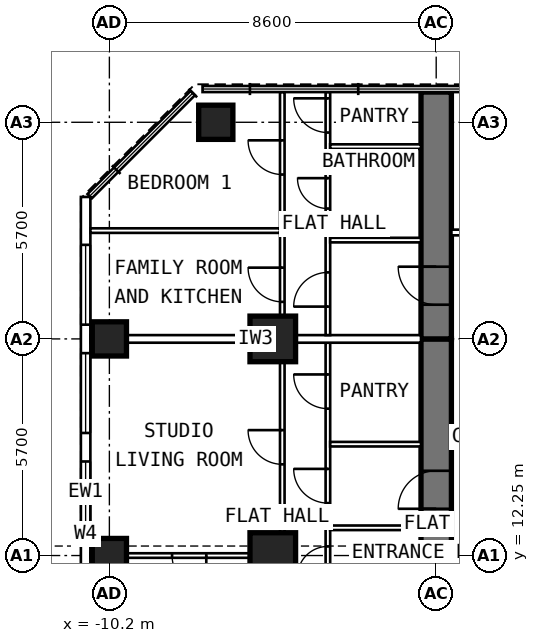
"""IFC4 building model, lengths in metres.
Left out: names, types, materials, properties, quantities, classifications, styles, units other than length and angle.
Written with IfcOpenShell. Run it as: python <this file> out.ifc"""

import sys

from ifc_helpers import new_model, si_unit, direction, frame, frame_2d, origin, origin_2d, place, context, subcontext, project, spatial, rectangle, extrude, element, fill, save


model = new_model("IFC4")
c1 = context("Model", 3, precision=1e-05, world=origin(), true_north=direction((0.0, 1.0)))
c2 = subcontext(c1, "Body", "Model", "MODEL_VIEW")
j1 = project(units=[si_unit("LENGTHUNIT", "METRE"), si_unit("PLANEANGLEUNIT", "RADIAN")], contexts=[c1])
p1 = place(None, origin())
s1 = spatial("IfcSite", under=j1, at=p1, CompositionType="ELEMENT")
p2 = place(p1, origin())
s2 = spatial("IfcBuilding", under=s1, at=p2, CompositionType="ELEMENT")
p3 = place(p2, frame((0.0, 0.0, 183.2)))
s3 = spatial("IfcBuildingStorey", under=s2, at=p3, CompositionType="ELEMENT", Elevation=183.2)
for number, where, z_axis, x_axis in (
    (1, (-10.2, 12.25, 0.0), (0.0, 0.0, 1.0), (0.0, 1.0, 0.0)),
    (2, (-10.2, 17.95, 0.0), (0.0, 0.0, 1.0), (0.0, 1.0, 0.0)),
    (3, (-7.4, 23.65, 0.0), (0.0, 0.0, 1.0), (0.0, 1.0, 0.0)),
):
    element("IfcColumn", number, at=place(p3, frame(where, z_axis=z_axis, x_axis=x_axis)), inside=s3, PredefinedType="COLUMN", context=c2, shape_type="SweptSolid", body=[
        extrude(rectangle(XDim=0.9, YDim=0.9, at=origin_2d()), origin(), (0.0, 0.0, 1.0), 3.6),
    ])
for number, where, z_axis, x_axis in (
    (4, (-5.9, 12.25, 0.0), (0.0, 0.0, 1.0), (0.0, 1.0, 0.0)),
    (5, (-5.9, 17.95, 0.0), (0.0, 0.0, 1.0), (0.0, 1.0, 0.0)),
):
    element("IfcColumn", number, at=place(p3, frame(where, z_axis=z_axis, x_axis=x_axis)), inside=s3, PredefinedType="COLUMN", context=c2, shape_type="SweptSolid", body=[
        extrude(rectangle(XDim=1.2, YDim=1.2, at=origin_2d()), origin(), (0.0, 0.0, 1.0), 3.6),
    ])
p4 = place(p3, frame((-1.6, 9.6, 0.0), z_axis=(0.0, 0.0, 1.0), x_axis=(0.0, 1.0, 0.0)))
e6 = element("IfcWall", 6, at=p4, inside=s3, PredefinedType="SHEAR", context=c2, shape_type="SweptSolid", body=[
    extrude(rectangle(XDim=8.35, YDim=0.8, at=frame_2d((4.175, 0.0))), origin(), (0.0, 0.0, 1.0), 3.6),
])
p5 = place(p4, frame((3.88, 0.0, 0.0)))
e7 = element("IfcOpeningElement", 7, at=p5, cuts=e6, PredefinedType="OPENING", context=c2, shape_type="SweptSolid", body=[
    extrude(rectangle(XDim=1.0, YDim=2.1, at=frame_2d((0.5, 1.05))), frame((0.0, 0.412, 0.0), z_axis=(0.0, -1.0, 0.0), x_axis=(1.0, 0.0, 0.0)), (0.0, 0.0, 1.0), 0.824),
])
p6 = place(p3, frame((-1.6, 17.95, 0.0), z_axis=(0.0, 0.0, 1.0), x_axis=(0.0, 1.0, 0.0)))
e8 = element("IfcWall", 8, at=p6, inside=s3, PredefinedType="SHEAR", context=c2, shape_type="SweptSolid", body=[
    extrude(rectangle(XDim=6.495, YDim=0.8, at=frame_2d((3.248, 0.0))), origin(), (0.0, 0.0, 1.0), 3.6),
])
p7 = place(p6, frame((0.9, 0.0, 0.0)))
e9 = element("IfcOpeningElement", 9, at=p7, cuts=e8, PredefinedType="OPENING", context=c2, shape_type="SweptSolid", body=[
    extrude(rectangle(XDim=1.0, YDim=2.1, at=frame_2d((0.5, 1.05))), frame((0.0, 0.412, 0.0), z_axis=(0.0, -1.0, 0.0), x_axis=(1.0, 0.0, 0.0)), (0.0, 0.0, 1.0), 0.824),
])
p8 = place(p3, frame((-10.825, 6.148, 0.0), z_axis=(0.0, 0.0, 1.0), x_axis=(0.0, 1.0, 0.0)))
e10 = element("IfcWall", 10, at=p8, inside=s3, PredefinedType="SOLIDWALL", context=c2, shape_type="SweptSolid", body=[
    extrude(rectangle(XDim=15.537, YDim=0.25, at=frame_2d((7.769, 0.0))), origin(), (0.0, 0.0, 1.0), 3.3),
])
p9 = place(p8, frame((0.777, 0.0, 0.8)))
e11 = element("IfcOpeningElement", 11, at=p9, cuts=e10, PredefinedType="OPENING", context=c2, shape_type="SweptSolid", body=[
    extrude(rectangle(XDim=2.1, YDim=1.8, at=frame_2d((1.05, 0.9))), frame((0.0, 0.137, 0.0), z_axis=(0.0, -1.0, 0.0), x_axis=(1.0, 0.0, 0.0)), (0.0, 0.0, 1.0), 0.274),
])
p10 = place(p8, frame((3.627, 0.0, 0.8)))
e12 = element("IfcOpeningElement", 12, at=p10, cuts=e10, PredefinedType="OPENING", context=c2, shape_type="SweptSolid", body=[
    extrude(rectangle(XDim=2.1, YDim=1.8, at=frame_2d((1.05, 0.9))), frame((0.0, 0.137, 0.0), z_axis=(0.0, -1.0, 0.0), x_axis=(1.0, 0.0, 0.0)), (0.0, 0.0, 1.0), 0.274),
])
p11 = place(p8, frame((6.477, 0.0, 0.8)))
e13 = element("IfcOpeningElement", 13, at=p11, cuts=e10, PredefinedType="OPENING", context=c2, shape_type="SweptSolid", body=[
    extrude(rectangle(XDim=2.1, YDim=1.8, at=frame_2d((1.05, 0.9))), frame((0.0, 0.137, 0.0), z_axis=(0.0, -1.0, 0.0), x_axis=(1.0, 0.0, 0.0)), (0.0, 0.0, 1.0), 0.274),
])
p12 = place(p8, frame((9.327, 0.0, 0.8)))
e14 = element("IfcOpeningElement", 14, at=p12, cuts=e10, PredefinedType="OPENING", context=c2, shape_type="SweptSolid", body=[
    extrude(rectangle(XDim=2.1, YDim=1.8, at=frame_2d((1.05, 0.9))), frame((0.0, 0.137, 0.0), z_axis=(0.0, -1.0, 0.0), x_axis=(1.0, 0.0, 0.0)), (0.0, 0.0, 1.0), 0.274),
])
p13 = place(p8, frame((12.177, 0.0, 0.8)))
e15 = element("IfcOpeningElement", 15, at=p13, cuts=e10, PredefinedType="OPENING", context=c2, shape_type="SweptSolid", body=[
    extrude(rectangle(XDim=2.1, YDim=1.8, at=frame_2d((1.05, 0.9))), frame((0.0, 0.137, 0.0), z_axis=(0.0, -1.0, 0.0), x_axis=(1.0, 0.0, 0.0)), (0.0, 0.0, 1.0), 0.274),
])
p14 = place(p3, frame((-4.45, 10.05, 0.0), z_axis=(0.0, 0.0, 1.0), x_axis=(0.0, 1.0, 0.0)))
e16 = element("IfcWall", 16, at=p14, inside=s3, PredefinedType="PARTITIONING", context=c2, shape_type="SweptSolid", body=[
    extrude(rectangle(XDim=7.8, YDim=0.12, at=frame_2d((3.9, 0.0))), origin(), (0.0, 0.0, 1.0), 3.3),
])
p15 = place(p14, frame((1.64, 0.0, 0.0)))
e17 = element("IfcOpeningElement", 17, at=p15, cuts=e16, PredefinedType="OPENING", context=c2, shape_type="SweptSolid", body=[
    extrude(rectangle(XDim=0.8, YDim=2.1, at=frame_2d((0.4, 1.05))), frame((0.0, 0.072, 0.0), z_axis=(0.0, -1.0, 0.0), x_axis=(1.0, 0.0, 0.0)), (0.0, 0.0, 1.0), 0.144),
])
p16 = place(p14, frame((3.58, 0.0, 0.0)))
e18 = element("IfcOpeningElement", 18, at=p16, cuts=e16, PredefinedType="OPENING", context=c2, shape_type="SweptSolid", body=[
    extrude(rectangle(XDim=0.9, YDim=2.1, at=frame_2d((0.45, 1.05))), frame((0.0, 0.072, 0.0), z_axis=(0.0, -1.0, 0.0), x_axis=(1.0, 0.0, 0.0)), (0.0, 0.0, 1.0), 0.144),
])
p17 = place(p14, frame((6.065, 0.0, 0.0)))
e19 = element("IfcOpeningElement", 19, at=p17, cuts=e16, PredefinedType="OPENING", context=c2, shape_type="SweptSolid", body=[
    extrude(rectangle(XDim=0.9, YDim=2.1, at=frame_2d((0.45, 1.05))), frame((0.0, 0.072, 0.0), z_axis=(0.0, -1.0, 0.0), x_axis=(1.0, 0.0, 0.0)), (0.0, 0.0, 1.0), 0.144),
])
p18 = place(p3, frame((-5.65, 9.6, 0.0), z_axis=(0.0, 0.0, 1.0), x_axis=(0.0, 1.0, 0.0)))
e20 = element("IfcWall", 20, at=p18, inside=s3, PredefinedType="PARTITIONING", context=c2, shape_type="SweptSolid", body=[
    extrude(rectangle(XDim=8.1, YDim=0.12, at=frame_2d((4.05, 0.0))), origin(), (0.0, 0.0, 1.0), 3.3),
])
p19 = place(p18, frame((5.05, 0.0, 0.0)))
e21 = element("IfcOpeningElement", 21, at=p19, cuts=e20, PredefinedType="OPENING", context=c2, shape_type="SweptSolid", body=[
    extrude(rectangle(XDim=0.9, YDim=2.1, at=frame_2d((0.45, 1.05))), frame((0.0, 0.072, 0.0), z_axis=(0.0, -1.0, 0.0), x_axis=(1.0, 0.0, 0.0)), (0.0, 0.0, 1.0), 0.144),
])
p20 = place(p3, frame((-5.71, 12.25, 0.0), z_axis=(0.0, 0.0, 1.0), x_axis=(-1.0, 0.0, 0.0)))
e22 = element("IfcWall", 22, at=p20, inside=s3, PredefinedType="PARTITIONING", context=c2, shape_type="SweptSolid", body=[
    extrude(rectangle(XDim=4.99, YDim=0.12, at=frame_2d((2.495, 0.0))), origin(), (0.0, 0.0, 1.0), 2.3),
])
p21 = place(p20, frame((1.94, 0.0, 0.0)))
e23 = element("IfcOpeningElement", 23, at=p21, cuts=e22, PredefinedType="OPENING", context=c2, shape_type="SweptSolid", body=[
    extrude(rectangle(XDim=0.9, YDim=2.1, at=frame_2d((0.45, 1.05))), frame((0.0, 0.072, 0.0), z_axis=(0.0, -1.0, 0.0), x_axis=(1.0, 0.0, 0.0)), (0.0, 0.0, 1.0), 0.144),
])
for number, where, z_axis, x_axis in (
    (24, (-2.0, 12.98, 0.0), (0.0, 0.0, 1.0), (-1.0, 0.0, 0.0)),
    (25, (-2.0, 15.18, 0.0), (0.0, 0.0, 1.0), (-1.0, 0.0, 0.0)),
):
    element("IfcWall", number, at=place(p3, frame(where, z_axis=z_axis, x_axis=x_axis)), inside=s3, PredefinedType="PARTITIONING", context=c2, shape_type="SweptSolid", body=[
        extrude(rectangle(XDim=2.39, YDim=0.12, at=frame_2d((1.195, 0.0))), origin(), (0.0, 0.0, 1.0), 3.3),
    ])
p22 = place(p3, frame((-4.45, 18.05, 0.0), z_axis=(0.0, 0.0, 1.0), x_axis=(0.0, 1.0, 0.0)))
e26 = element("IfcWall", 26, at=p22, inside=s3, PredefinedType="PARTITIONING", context=c2, shape_type="SweptSolid", body=[
    extrude(rectangle(XDim=6.395, YDim=0.12, at=frame_2d((3.198, 0.0))), origin(), (0.0, 0.0, 1.0), 3.3),
])
p23 = place(p22, frame((0.75, 0.0, 0.0)))
e27 = element("IfcOpeningElement", 27, at=p23, cuts=e26, PredefinedType="OPENING", context=c2, shape_type="SweptSolid", body=[
    extrude(rectangle(XDim=0.9, YDim=2.1, at=frame_2d((0.45, 1.05))), frame((0.0, 0.072, 0.0), z_axis=(0.0, -1.0, 0.0), x_axis=(1.0, 0.0, 0.0)), (0.0, 0.0, 1.0), 0.144),
])
p24 = place(p22, frame((3.33, 0.0, 0.0)))
e28 = element("IfcOpeningElement", 28, at=p24, cuts=e26, PredefinedType="OPENING", context=c2, shape_type="SweptSolid", body=[
    extrude(rectangle(XDim=0.8, YDim=2.1, at=frame_2d((0.4, 1.05))), frame((0.0, 0.072, 0.0), z_axis=(0.0, -1.0, 0.0), x_axis=(1.0, 0.0, 0.0)), (0.0, 0.0, 1.0), 0.144),
])
p25 = place(p22, frame((5.33, 0.0, 0.0)))
e29 = element("IfcOpeningElement", 29, at=p25, cuts=e26, PredefinedType="OPENING", context=c2, shape_type="SweptSolid", body=[
    extrude(rectangle(XDim=0.9, YDim=2.1, at=frame_2d((0.45, 1.05))), frame((0.0, 0.072, 0.0), z_axis=(0.0, -1.0, 0.0), x_axis=(1.0, 0.0, 0.0)), (0.0, 0.0, 1.0), 0.144),
])
p26 = place(p3, frame((-5.65, 18.05, 0.0), z_axis=(0.0, 0.0, 1.0), x_axis=(0.0, 1.0, 0.0)))
e30 = element("IfcWall", 30, at=p26, inside=s3, PredefinedType="PARTITIONING", context=c2, shape_type="SweptSolid", body=[
    extrude(rectangle(XDim=6.395, YDim=0.12, at=frame_2d((3.198, 0.0))), origin(), (0.0, 0.0, 1.0), 3.3),
])
p27 = place(p26, frame((0.875, 0.0, 0.0)))
e31 = element("IfcOpeningElement", 31, at=p27, cuts=e30, PredefinedType="OPENING", context=c2, shape_type="SweptSolid", body=[
    extrude(rectangle(XDim=0.9, YDim=2.1, at=frame_2d((0.45, 1.05))), frame((0.0, 0.072, 0.0), z_axis=(0.0, -1.0, 0.0), x_axis=(1.0, 0.0, 0.0)), (0.0, 0.0, 1.0), 0.144),
])
p28 = place(p26, frame((4.225, 0.0, 0.0)))
e32 = element("IfcOpeningElement", 32, at=p28, cuts=e30, PredefinedType="OPENING", context=c2, shape_type="SweptSolid", body=[
    extrude(rectangle(XDim=0.9, YDim=2.1, at=frame_2d((0.45, 1.05))), frame((0.0, 0.072, 0.0), z_axis=(0.0, -1.0, 0.0), x_axis=(1.0, 0.0, 0.0)), (0.0, 0.0, 1.0), 0.144),
])
p29 = place(p3, frame((-5.71, 20.8, 0.0), z_axis=(0.0, 0.0, 1.0), x_axis=(-1.0, 0.0, 0.0)))
e33 = element("IfcWall", 33, at=p29, inside=s3, PredefinedType="PARTITIONING", context=c2, shape_type="SweptSolid", body=[
    extrude(rectangle(XDim=4.99, YDim=0.12, at=frame_2d((2.495, 0.0))), origin(), (0.0, 0.0, 1.0), 3.3),
])
for number, where, z_axis, x_axis in (
    (34, (-2.0, 20.55, 0.0), (0.0, 0.0, 1.0), (-1.0, 0.0, 0.0)),
    (35, (-2.0, 23.01, 0.0), (0.0, 0.0, 1.0), (-1.0, 0.0, 0.0)),
):
    element("IfcWall", number, at=place(p3, frame(where, z_axis=z_axis, x_axis=x_axis)), inside=s3, PredefinedType="PARTITIONING", context=c2, shape_type="SweptSolid", body=[
        extrude(rectangle(XDim=2.39, YDim=0.12, at=frame_2d((1.195, 0.0))), origin(), (0.0, 0.0, 1.0), 3.3),
    ])
p30 = place(p3, frame((-2.0, 17.95, 0.0), z_axis=(0.0, 0.0, 1.0), x_axis=(-1.0, 0.0, 0.0)))
e36 = element("IfcWall", 36, at=p30, inside=s3, PredefinedType="PARTITIONING", context=c2, shape_type="SweptSolid", body=[
    extrude(rectangle(XDim=8.7, YDim=0.2, at=frame_2d((4.35, 0.0))), origin(), (0.0, 0.0, 1.0), 3.3),
])
p31 = place(p3, frame((1.2, 20.75, 0.0), z_axis=(0.0, 0.0, 1.0), x_axis=(-1.0, 0.0, 0.0)))
e37 = element("IfcWall", 37, at=p31, inside=s3, PredefinedType="PARTITIONING", context=c2, shape_type="SweptSolid", body=[
    extrude(rectangle(XDim=2.4, YDim=0.15, at=frame_2d((1.2, 0.0))), origin(), (0.0, 0.0, 1.0), 3.3),
])
p32 = place(p31, frame((0.7, 0.0, 0.0)))
e38 = element("IfcOpeningElement", 38, at=p32, cuts=e37, PredefinedType="OPENING", context=c2, shape_type="SweptSolid", body=[
    extrude(rectangle(XDim=1.0, YDim=2.1, at=frame_2d((0.5, 1.05))), frame((0.0, 0.087, 0.0), z_axis=(0.0, -1.0, 0.0), x_axis=(1.0, 0.0, 0.0)), (0.0, 0.0, 1.0), 0.174),
])
p33 = place(p11, origin())
e39 = element("IfcWindow", 39, at=p33, inside=s3, PartitioningType="SINGLE_PANEL", PredefinedType="WINDOW", context=c2, shape_type="SweptSolid", body=[
    extrude(rectangle(XDim=2.1, YDim=1.8, at=frame_2d((1.05, 0.9))), frame((0.0, 0.03, 0.0), z_axis=(0.0, -1.0, 0.0), x_axis=(1.0, 0.0, 0.0)), (0.0, 0.0, 1.0), 0.06),
])
fill(e13, e39)
p34 = place(p12, origin())
e40 = element("IfcWindow", 40, at=p34, inside=s3, PartitioningType="SINGLE_PANEL", PredefinedType="WINDOW", context=c2, shape_type="SweptSolid", body=[
    extrude(rectangle(XDim=2.1, YDim=1.8, at=frame_2d((1.05, 0.9))), frame((0.0, 0.03, 0.0), z_axis=(0.0, -1.0, 0.0), x_axis=(1.0, 0.0, 0.0)), (0.0, 0.0, 1.0), 0.06),
])
fill(e14, e40)
p35 = place(p13, origin())
e41 = element("IfcWindow", 41, at=p35, inside=s3, PartitioningType="SINGLE_PANEL", PredefinedType="WINDOW", context=c2, shape_type="SweptSolid", body=[
    extrude(rectangle(XDim=2.1, YDim=1.8, at=frame_2d((1.05, 0.9))), frame((0.0, 0.03, 0.0), z_axis=(0.0, -1.0, 0.0), x_axis=(1.0, 0.0, 0.0)), (0.0, 0.0, 1.0), 0.06),
])
fill(e15, e41)
p36 = place(p21, origin())
e42 = element("IfcDoor", 42, at=p36, inside=s3, OperationType="SINGLE_SWING_LEFT", PredefinedType="DOOR", context=c2, shape_type="SweptSolid", body=[
    extrude(rectangle(XDim=0.9, YDim=2.1, at=frame_2d((0.45, 1.05))), frame((0.0, 0.025, 0.0), z_axis=(0.0, -1.0, 0.0), x_axis=(1.0, 0.0, 0.0)), (0.0, 0.0, 1.0), 0.05),
])
fill(e23, e42)
p37 = place(p5, origin())
e43 = element("IfcDoor", 43, at=p37, inside=s3, OperationType="SINGLE_SWING_LEFT", PredefinedType="DOOR", context=c2, shape_type="SweptSolid", body=[
    extrude(rectangle(XDim=1.0, YDim=2.1, at=frame_2d((0.5, 1.05))), frame((0.0, 0.15, 0.0), z_axis=(0.0, -1.0, 0.0), x_axis=(1.0, 0.0, 0.0)), (0.0, 0.0, 1.0), 0.3),
])
fill(e7, e43)
p38 = place(p19, origin())
e44 = element("IfcDoor", 44, at=p38, inside=s3, OperationType="SINGLE_SWING_RIGHT", PredefinedType="DOOR", context=c2, shape_type="SweptSolid", body=[
    extrude(rectangle(XDim=0.9, YDim=2.1, at=frame_2d((0.45, 1.05))), frame((0.0, 0.025, 0.0), z_axis=(0.0, -1.0, 0.0), x_axis=(1.0, 0.0, 0.0)), (0.0, 0.0, 1.0), 0.05),
])
fill(e21, e44)
p39 = place(p15, origin())
e45 = element("IfcDoor", 45, at=p39, inside=s3, OperationType="SINGLE_SWING_LEFT", PredefinedType="DOOR", context=c2, shape_type="SweptSolid", body=[
    extrude(rectangle(XDim=0.8, YDim=2.1, at=frame_2d((0.4, 1.05))), frame((0.0, 0.025, 0.0), z_axis=(0.0, -1.0, 0.0), x_axis=(1.0, 0.0, 0.0)), (0.0, 0.0, 1.0), 0.05),
])
fill(e17, e45)
p40 = place(p16, origin())
e46 = element("IfcDoor", 46, at=p40, inside=s3, OperationType="SINGLE_SWING_RIGHT", PredefinedType="DOOR", context=c2, shape_type="SweptSolid", body=[
    extrude(rectangle(XDim=0.9, YDim=2.1, at=frame_2d((0.45, 1.05))), frame((0.0, 0.025, 0.0), z_axis=(0.0, -1.0, 0.0), x_axis=(1.0, 0.0, 0.0)), (0.0, 0.0, 1.0), 0.05),
])
fill(e18, e46)
p41 = place(p17, origin())
e47 = element("IfcDoor", 47, at=p41, inside=s3, OperationType="SINGLE_SWING_RIGHT", PredefinedType="DOOR", context=c2, shape_type="SweptSolid", body=[
    extrude(rectangle(XDim=0.9, YDim=2.1, at=frame_2d((0.45, 1.05))), frame((0.0, 0.025, 0.0), z_axis=(0.0, -1.0, 0.0), x_axis=(1.0, 0.0, 0.0)), (0.0, 0.0, 1.0), 0.05),
])
fill(e19, e47)
p42 = place(p7, origin())
e48 = element("IfcDoor", 48, at=p42, inside=s3, OperationType="SINGLE_SWING_RIGHT", PredefinedType="DOOR", context=c2, shape_type="SweptSolid", body=[
    extrude(rectangle(XDim=1.0, YDim=2.1, at=frame_2d((0.5, 1.05))), frame((0.0, 0.15, 0.0), z_axis=(0.0, -1.0, 0.0), x_axis=(1.0, 0.0, 0.0)), (0.0, 0.0, 1.0), 0.3),
])
fill(e9, e48)
p43 = place(p27, origin())
e49 = element("IfcDoor", 49, at=p43, inside=s3, OperationType="SINGLE_SWING_RIGHT", PredefinedType="DOOR", context=c2, shape_type="SweptSolid", body=[
    extrude(rectangle(XDim=0.9, YDim=2.1, at=frame_2d((0.45, 1.05))), frame((0.0, 0.025, 0.0), z_axis=(0.0, -1.0, 0.0), x_axis=(1.0, 0.0, 0.0)), (0.0, 0.0, 1.0), 0.05),
])
fill(e31, e49)
p44 = place(p28, origin())
e50 = element("IfcDoor", 50, at=p44, inside=s3, OperationType="SINGLE_SWING_RIGHT", PredefinedType="DOOR", context=c2, shape_type="SweptSolid", body=[
    extrude(rectangle(XDim=0.9, YDim=2.1, at=frame_2d((0.45, 1.05))), frame((0.0, 0.025, 0.0), z_axis=(0.0, -1.0, 0.0), x_axis=(1.0, 0.0, 0.0)), (0.0, 0.0, 1.0), 0.05),
])
fill(e32, e50)
p45 = place(p23, origin())
e51 = element("IfcDoor", 51, at=p45, inside=s3, OperationType="SINGLE_SWING_LEFT", PredefinedType="DOOR", context=c2, shape_type="SweptSolid", body=[
    extrude(rectangle(XDim=0.9, YDim=2.1, at=frame_2d((0.45, 1.05))), frame((0.0, 0.025, 0.0), z_axis=(0.0, -1.0, 0.0), x_axis=(1.0, 0.0, 0.0)), (0.0, 0.0, 1.0), 0.05),
])
fill(e27, e51)
p46 = place(p24, origin())
e52 = element("IfcDoor", 52, at=p46, inside=s3, OperationType="SINGLE_SWING_RIGHT", PredefinedType="DOOR", context=c2, shape_type="SweptSolid", body=[
    extrude(rectangle(XDim=0.8, YDim=2.1, at=frame_2d((0.4, 1.05))), frame((0.0, 0.025, 0.0), z_axis=(0.0, -1.0, 0.0), x_axis=(1.0, 0.0, 0.0)), (0.0, 0.0, 1.0), 0.05),
])
fill(e28, e52)
p47 = place(p25, origin())
e53 = element("IfcDoor", 53, at=p47, inside=s3, OperationType="SINGLE_SWING_RIGHT", PredefinedType="DOOR", context=c2, shape_type="SweptSolid", body=[
    extrude(rectangle(XDim=0.9, YDim=2.1, at=frame_2d((0.45, 1.05))), frame((0.0, 0.025, 0.0), z_axis=(0.0, -1.0, 0.0), x_axis=(1.0, 0.0, 0.0)), (0.0, 0.0, 1.0), 0.05),
])
fill(e29, e53)
save(model, sys.argv[1])
